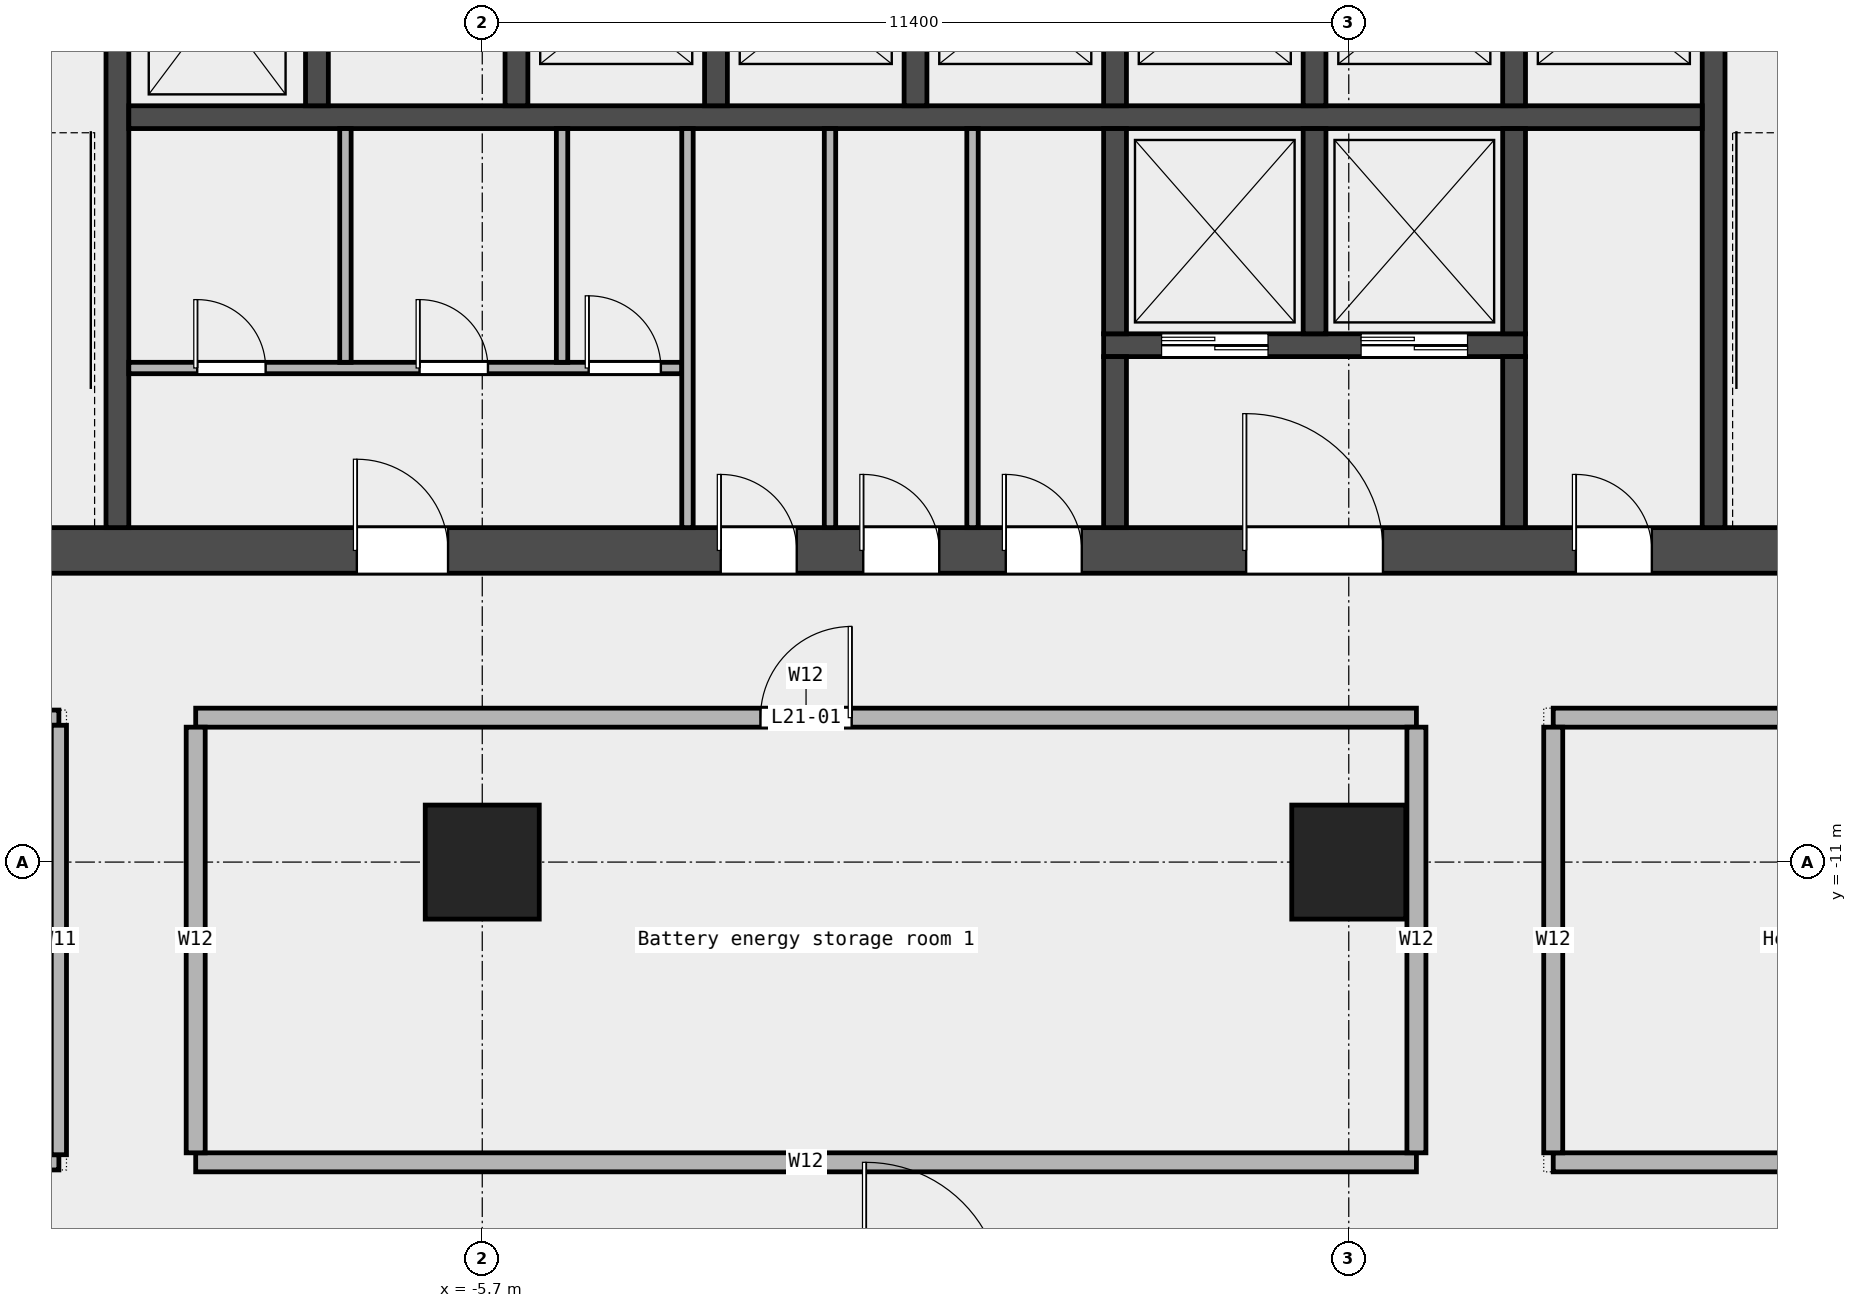
"""IFC4 building model, lengths in metres.
Left out: names, types, materials, properties, quantities, classifications, styles, units other than length and angle.
Written with IfcOpenShell. Run it as: python <this file> out.ifc"""

import sys

from ifc_helpers import new_model, si_unit, direction, frame, frame_2d, origin, origin_2d, place, context, subcontext, project, spatial, rectangle, extrude, element, fill, save


model = new_model("IFC4")
c1 = context("Model", 3, precision=1e-05, world=origin(), true_north=direction((0.0, 1.0)))
c2 = subcontext(c1, "Body", "Model", "MODEL_VIEW")
j1 = project(units=[si_unit("LENGTHUNIT", "METRE"), si_unit("PLANEANGLEUNIT", "RADIAN")], contexts=[c1])
p1 = place(None, origin())
s1 = spatial("IfcSite", under=j1, at=p1, CompositionType="ELEMENT")
p2 = place(p1, origin())
s2 = spatial("IfcBuilding", under=s1, at=p2, CompositionType="ELEMENT")
p3 = place(p2, frame((0.0, 0.0, 108.1)))
s3 = spatial("IfcBuildingStorey", under=s2, at=p3, CompositionType="ELEMENT", Elevation=108.1)
for number, where, z_axis, x_axis in (
    (1, (-5.7, -11.0, 0.0), (0.0, 0.0, 1.0), (1.0, 0.0, 0.0)),
    (2, (5.7, -11.0, 0.0), (0.0, 0.0, 1.0), (1.0, 0.0, 0.0)),
):
    element("IfcColumn", number, at=place(p3, frame(where, z_axis=z_axis, x_axis=x_axis)), inside=s3, PredefinedType="COLUMN", context=c2, shape_type="SweptSolid", body=[
        extrude(rectangle(XDim=1.5, YDim=1.5, at=origin_2d()), origin(), (0.0, 0.0, 1.0), 4.05),
    ])
p4 = place(p3, frame((-18.365, -14.95, 0.0), z_axis=(0.0, 0.0, 1.0), x_axis=(1.0, 0.0, 0.0)))
e3 = element("IfcWall", 3, at=p4, inside=s3, PredefinedType="PARTITIONING", context=c2, shape_type="SweptSolid", body=[
    extrude(rectangle(XDim=7.095, YDim=0.2, at=frame_2d((3.547, 0.0))), origin(), (0.0, 0.0, 1.0), 4.05),
])
p5 = place(p4, frame((3.097, 0.0, 0.0)))
e4 = element("IfcOpeningElement", 4, at=p5, cuts=e3, PredefinedType="OPENING", context=c2, shape_type="SweptSolid", body=[
    extrude(rectangle(XDim=0.9, YDim=2.1, at=frame_2d((0.45, 1.05))), frame((0.0, 0.112, 0.0), z_axis=(0.0, -1.0, 0.0), x_axis=(1.0, 0.0, 0.0)), (0.0, 0.0, 1.0), 0.224),
])
p6 = place(p3, frame((-9.47, -14.95, 0.0), z_axis=(0.0, 0.0, 1.0), x_axis=(1.0, 0.0, 0.0)))
e5 = element("IfcWall", 5, at=p6, inside=s3, PredefinedType="PARTITIONING", context=c2, shape_type="SweptSolid", body=[
    extrude(rectangle(XDim=16.06, YDim=0.25, at=frame_2d((8.03, 0.0))), origin(), (0.0, 0.0, 1.0), 4.05),
])
p7 = place(p3, frame((8.39, -14.95, 0.0), z_axis=(0.0, 0.0, 1.0), x_axis=(1.0, 0.0, 0.0)))
e6 = element("IfcWall", 6, at=p7, inside=s3, PredefinedType="PARTITIONING", context=c2, shape_type="SweptSolid", body=[
    extrude(rectangle(XDim=7.655, YDim=0.25, at=frame_2d((3.828, 0.0))), origin(), (0.0, 0.0, 1.0), 4.05),
])
p8 = place(p3, frame((-16.3, -9.1, 0.0), z_axis=(0.0, 0.0, 1.0), x_axis=(1.0, 0.0, 0.0)))
e7 = element("IfcWall", 7, at=p8, inside=s3, PredefinedType="PARTITIONING", context=c2, shape_type="SweptSolid", body=[
    extrude(rectangle(XDim=5.03, YDim=0.2, at=frame_2d((2.515, 0.0))), origin(), (0.0, 0.0, 1.0), 4.05),
])
p9 = place(p3, frame((-9.47, -9.1, 0.0), z_axis=(0.0, 0.0, 1.0), x_axis=(1.0, 0.0, 0.0)))
e8 = element("IfcWall", 8, at=p9, inside=s3, PredefinedType="PARTITIONING", context=c2, shape_type="SweptSolid", body=[
    extrude(rectangle(XDim=16.06, YDim=0.25, at=frame_2d((8.03, 0.0))), origin(), (0.0, 0.0, 1.0), 4.05),
])
p10 = place(p9, frame((7.43, 0.0, 0.0)))
e9 = element("IfcOpeningElement", 9, at=p10, cuts=e8, PredefinedType="OPENING", context=c2, shape_type="SweptSolid", body=[
    extrude(rectangle(XDim=1.2, YDim=2.1, at=frame_2d((0.6, 1.05))), frame((0.0, 0.137, 0.0), z_axis=(0.0, -1.0, 0.0), x_axis=(1.0, 0.0, 0.0)), (0.0, 0.0, 1.0), 0.274),
])
p11 = place(p3, frame((8.39, -9.1, 0.0), z_axis=(0.0, 0.0, 1.0), x_axis=(1.0, 0.0, 0.0)))
e10 = element("IfcWall", 10, at=p11, inside=s3, PredefinedType="PARTITIONING", context=c2, shape_type="SweptSolid", body=[
    extrude(rectangle(XDim=7.655, YDim=0.25, at=frame_2d((3.828, 0.0))), origin(), (0.0, 0.0, 1.0), 4.05),
])
p12 = place(p11, frame((3.377, 0.0, 0.0)))
e11 = element("IfcOpeningElement", 11, at=p12, cuts=e10, PredefinedType="OPENING", context=c2, shape_type="SweptSolid", body=[
    extrude(rectangle(XDim=0.9, YDim=2.1, at=frame_2d((0.45, 1.05))), frame((0.0, 0.137, 0.0), z_axis=(0.0, -1.0, 0.0), x_axis=(1.0, 0.0, 0.0)), (0.0, 0.0, 1.0), 0.274),
])
p13 = place(p3, frame((-11.27, -14.85, 0.0), z_axis=(0.0, 0.0, 1.0), x_axis=(0.0, 1.0, 0.0)))
e12 = element("IfcWall", 12, at=p13, inside=s3, PredefinedType="PARTITIONING", context=c2, shape_type="SweptSolid", body=[
    extrude(rectangle(XDim=5.65, YDim=0.2, at=frame_2d((2.825, 0.0))), origin(), (0.0, 0.0, 1.0), 4.05),
])
for number, where, z_axis, x_axis in (
    (13, (-9.47, -14.825, 0.0), (0.0, 0.0, 1.0), (0.0, 1.0, 0.0)),
    (14, (6.59, -14.825, 0.0), (0.0, 0.0, 1.0), (0.0, 1.0, 0.0)),
    (15, (8.39, -14.825, 0.0), (0.0, 0.0, 1.0), (0.0, 1.0, 0.0)),
):
    element("IfcWall", number, at=place(p3, frame(where, z_axis=z_axis, x_axis=x_axis)), inside=s3, PredefinedType="PARTITIONING", context=c2, shape_type="SweptSolid", body=[
        extrude(rectangle(XDim=5.6, YDim=0.25, at=frame_2d((2.8, 0.0))), origin(), (0.0, 0.0, 1.0), 4.05),
    ])
p14 = place(p3, frame((-14.4, -6.9, 0.0), z_axis=(0.0, 0.0, 1.0), x_axis=(1.0, 0.0, 0.0)))
e16 = element("IfcWall", 16, at=p14, inside=s3, PredefinedType="SHEAR", context=c2, shape_type="SweptSolid", body=[
    extrude(rectangle(XDim=28.8, YDim=0.6, at=frame_2d((14.4, 0.0))), origin(), (0.0, 0.0, 1.0), 4.2),
])
p15 = place(p14, frame((7.05, 0.0, 0.0)))
e17 = element("IfcOpeningElement", 17, at=p15, cuts=e16, PredefinedType="OPENING", context=c2, shape_type="SweptSolid", body=[
    extrude(rectangle(XDim=1.2, YDim=2.1, at=frame_2d((0.6, 1.05))), frame((0.0, 0.312, 0.0), z_axis=(0.0, -1.0, 0.0), x_axis=(1.0, 0.0, 0.0)), (0.0, 0.0, 1.0), 0.624),
])
p16 = place(p14, frame((11.837, 0.0, 0.0)))
e18 = element("IfcOpeningElement", 18, at=p16, cuts=e16, PredefinedType="OPENING", context=c2, shape_type="SweptSolid", body=[
    extrude(rectangle(XDim=1.0, YDim=2.1, at=frame_2d((0.5, 1.05))), frame((0.0, 0.312, 0.0), z_axis=(0.0, -1.0, 0.0), x_axis=(1.0, 0.0, 0.0)), (0.0, 0.0, 1.0), 0.624),
])
p17 = place(p14, frame((13.712, 0.0, 0.0)))
e19 = element("IfcOpeningElement", 19, at=p17, cuts=e16, PredefinedType="OPENING", context=c2, shape_type="SweptSolid", body=[
    extrude(rectangle(XDim=1.0, YDim=2.1, at=frame_2d((0.5, 1.05))), frame((0.0, 0.312, 0.0), z_axis=(0.0, -1.0, 0.0), x_axis=(1.0, 0.0, 0.0)), (0.0, 0.0, 1.0), 0.624),
])
p18 = place(p14, frame((15.587, 0.0, 0.0)))
e20 = element("IfcOpeningElement", 20, at=p18, cuts=e16, PredefinedType="OPENING", context=c2, shape_type="SweptSolid", body=[
    extrude(rectangle(XDim=1.0, YDim=2.1, at=frame_2d((0.5, 1.05))), frame((0.0, 0.312, 0.0), z_axis=(0.0, -1.0, 0.0), x_axis=(1.0, 0.0, 0.0)), (0.0, 0.0, 1.0), 0.624),
])
p19 = place(p14, frame((18.75, 0.0, 0.0)))
e21 = element("IfcOpeningElement", 21, at=p19, cuts=e16, PredefinedType="OPENING", context=c2, shape_type="SweptSolid", body=[
    extrude(rectangle(XDim=1.8, YDim=2.1, at=frame_2d((0.9, 1.05))), frame((0.0, 0.312, 0.0), z_axis=(0.0, -1.0, 0.0), x_axis=(1.0, 0.0, 0.0)), (0.0, 0.0, 1.0), 0.624),
])
p20 = place(p14, frame((23.087, 0.0, 0.0)))
e22 = element("IfcOpeningElement", 22, at=p20, cuts=e16, PredefinedType="OPENING", context=c2, shape_type="SweptSolid", body=[
    extrude(rectangle(XDim=1.0, YDim=2.1, at=frame_2d((0.5, 1.05))), frame((0.0, 0.312, 0.0), z_axis=(0.0, -1.0, 0.0), x_axis=(1.0, 0.0, 0.0)), (0.0, 0.0, 1.0), 0.624),
])
for number, where, z_axis, x_axis in (
    (23, (-10.5, -6.6, 0.0), (0.0, 0.0, 1.0), (0.0, 1.0, 0.0)),
    (24, (10.5, -6.6, 0.0), (0.0, 0.0, 1.0), (0.0, 1.0, 0.0)),
):
    element("IfcWall", number, at=place(p3, frame(where, z_axis=z_axis, x_axis=x_axis)), inside=s3, PredefinedType="SHEAR", context=c2, shape_type="SweptSolid", body=[
        extrude(rectangle(XDim=8.55, YDim=0.3, at=frame_2d((4.275, 0.0))), origin(), (0.0, 0.0, 1.0), 4.2),
    ])
p21 = place(p3, frame((-10.35, -1.2, 0.0), z_axis=(0.0, 0.0, 1.0), x_axis=(1.0, 0.0, 0.0)))
e25 = element("IfcWall", 25, at=p21, inside=s3, PredefinedType="SOLIDWALL", context=c2, shape_type="SweptSolid", body=[
    extrude(rectangle(XDim=20.7, YDim=0.3, at=frame_2d((10.35, 0.0))), origin(), (0.0, 0.0, 1.0), 4.2),
])
for number, where, z_axis, x_axis in (
    (26, (-7.875, -1.05, 0.0), (0.0, 0.0, 1.0), (0.0, 1.0, 0.0)),
    (27, (-5.25, -1.05, 0.0), (0.0, 0.0, 1.0), (0.0, 1.0, 0.0)),
    (28, (-2.625, -1.05, 0.0), (0.0, 0.0, 1.0), (0.0, 1.0, 0.0)),
    (29, (0.0, -1.05, 0.0), (0.0, 0.0, 1.0), (0.0, 1.0, 0.0)),
    (30, (2.625, -1.05, 0.0), (0.0, 0.0, 1.0), (0.0, 1.0, 0.0)),
    (31, (5.25, -1.05, 0.0), (0.0, 0.0, 1.0), (0.0, 1.0, 0.0)),
    (32, (7.875, -1.05, 0.0), (0.0, 0.0, 1.0), (0.0, 1.0, 0.0)),
):
    element("IfcWall", number, at=place(p3, frame(where, z_axis=z_axis, x_axis=x_axis)), inside=s3, PredefinedType="SOLIDWALL", context=c2, shape_type="SweptSolid", body=[
        extrude(rectangle(XDim=2.7, YDim=0.3, at=frame_2d((1.35, 0.0))), origin(), (0.0, 0.0, 1.0), 4.2),
    ])
p22 = place(p3, frame((2.475, -4.2, 0.0), z_axis=(0.0, 0.0, 1.0), x_axis=(1.0, 0.0, 0.0)))
e33 = element("IfcWall", 33, at=p22, inside=s3, PredefinedType="SOLIDWALL", context=c2, shape_type="SweptSolid", body=[
    extrude(rectangle(XDim=5.55, YDim=0.3, at=frame_2d((2.775, 0.0))), origin(), (0.0, 0.0, 1.0), 4.2),
])
p23 = place(p22, frame((0.762, 0.0, 0.0)))
e34 = element("IfcOpeningElement", 34, at=p23, cuts=e33, PredefinedType="OPENING", context=c2, shape_type="SweptSolid", body=[
    extrude(rectangle(XDim=1.4, YDim=2.1, at=frame_2d((0.7, 1.05))), frame((0.0, 0.162, 0.0), z_axis=(0.0, -1.0, 0.0), x_axis=(1.0, 0.0, 0.0)), (0.0, 0.0, 1.0), 0.324),
])
p24 = place(p22, frame((3.387, 0.0, 0.0)))
e35 = element("IfcOpeningElement", 35, at=p24, cuts=e33, PredefinedType="OPENING", context=c2, shape_type="SweptSolid", body=[
    extrude(rectangle(XDim=1.4, YDim=2.1, at=frame_2d((0.7, 1.05))), frame((0.0, 0.162, 0.0), z_axis=(0.0, -1.0, 0.0), x_axis=(1.0, 0.0, 0.0)), (0.0, 0.0, 1.0), 0.324),
])
p25 = place(p3, frame((2.625, -4.05, 0.0), z_axis=(0.0, 0.0, 1.0), x_axis=(0.0, 1.0, 0.0)))
e36 = element("IfcWall", 36, at=p25, inside=s3, PredefinedType="SOLIDWALL", context=c2, shape_type="SweptSolid", body=[
    extrude(rectangle(XDim=2.7, YDim=0.3, at=frame_2d((1.35, 0.0))), origin(), (0.0, 0.0, 1.0), 4.2),
])
p26 = place(p3, frame((2.625, -6.6, 0.0), z_axis=(0.0, 0.0, 1.0), x_axis=(0.0, 1.0, 0.0)))
e37 = element("IfcWall", 37, at=p26, inside=s3, PredefinedType="SOLIDWALL", context=c2, shape_type="SweptSolid", body=[
    extrude(rectangle(XDim=2.25, YDim=0.3, at=frame_2d((1.125, 0.0))), origin(), (0.0, 0.0, 1.0), 4.2),
])
for number, where, z_axis, x_axis in (
    (38, (5.25, -4.05, 0.0), (0.0, 0.0, 1.0), (0.0, 1.0, 0.0)),
    (39, (7.875, -4.05, 0.0), (0.0, 0.0, 1.0), (0.0, 1.0, 0.0)),
):
    element("IfcWall", number, at=place(p3, frame(where, z_axis=z_axis, x_axis=x_axis)), inside=s3, PredefinedType="SOLIDWALL", context=c2, shape_type="SweptSolid", body=[
        extrude(rectangle(XDim=2.7, YDim=0.3, at=frame_2d((1.35, 0.0))), origin(), (0.0, 0.0, 1.0), 4.2),
    ])
p27 = place(p3, frame((7.875, -6.6, 0.0), z_axis=(0.0, 0.0, 1.0), x_axis=(0.0, 1.0, 0.0)))
e40 = element("IfcWall", 40, at=p27, inside=s3, PredefinedType="SOLIDWALL", context=c2, shape_type="SweptSolid", body=[
    extrude(rectangle(XDim=2.25, YDim=0.3, at=frame_2d((1.125, 0.0))), origin(), (0.0, 0.0, 1.0), 4.2),
])
p28 = place(p3, frame((-10.35, -4.5, 0.0), z_axis=(0.0, 0.0, 1.0), x_axis=(1.0, 0.0, 0.0)))
e41 = element("IfcWall", 41, at=p28, inside=s3, PredefinedType="PARTITIONING", context=c2, shape_type="SweptSolid", body=[
    extrude(rectangle(XDim=7.275, YDim=0.15, at=frame_2d((3.638, 0.0))), origin(), (0.0, 0.0, 1.0), 4.2),
])
p29 = place(p28, frame((0.9, 0.0, 0.0)))
e42 = element("IfcOpeningElement", 42, at=p29, cuts=e41, PredefinedType="OPENING", context=c2, shape_type="SweptSolid", body=[
    extrude(rectangle(XDim=0.9, YDim=2.1, at=frame_2d((0.45, 1.05))), frame((0.0, 0.087, 0.0), z_axis=(0.0, -1.0, 0.0), x_axis=(1.0, 0.0, 0.0)), (0.0, 0.0, 1.0), 0.174),
])
p30 = place(p28, frame((3.825, 0.0, 0.0)))
e43 = element("IfcOpeningElement", 43, at=p30, cuts=e41, PredefinedType="OPENING", context=c2, shape_type="SweptSolid", body=[
    extrude(rectangle(XDim=0.9, YDim=2.1, at=frame_2d((0.45, 1.05))), frame((0.0, 0.087, 0.0), z_axis=(0.0, -1.0, 0.0), x_axis=(1.0, 0.0, 0.0)), (0.0, 0.0, 1.0), 0.174),
])
p31 = place(p28, frame((6.05, 0.0, 0.0)))
e44 = element("IfcOpeningElement", 44, at=p31, cuts=e41, PredefinedType="OPENING", context=c2, shape_type="SweptSolid", body=[
    extrude(rectangle(XDim=0.95, YDim=2.1, at=frame_2d((0.475, 1.05))), frame((0.0, 0.087, 0.0), z_axis=(0.0, -1.0, 0.0), x_axis=(1.0, 0.0, 0.0)), (0.0, 0.0, 1.0), 0.174),
])
for number, where, z_axis, x_axis in (
    (45, (-7.5, -4.425, 0.0), (0.0, 0.0, 1.0), (0.0, 1.0, 0.0)),
    (46, (-4.65, -4.425, 0.0), (0.0, 0.0, 1.0), (0.0, 1.0, 0.0)),
):
    element("IfcWall", number, at=place(p3, frame(where, z_axis=z_axis, x_axis=x_axis)), inside=s3, PredefinedType="PARTITIONING", context=c2, shape_type="SweptSolid", body=[
        extrude(rectangle(XDim=3.075, YDim=0.15, at=frame_2d((1.538, 0.0))), origin(), (0.0, 0.0, 1.0), 4.2),
    ])
for number, where, z_axis, x_axis in (
    (47, (-3.0, -6.6, 0.0), (0.0, 0.0, 1.0), (0.0, 1.0, 0.0)),
    (48, (-1.125, -6.6, 0.0), (0.0, 0.0, 1.0), (0.0, 1.0, 0.0)),
    (49, (0.75, -6.6, 0.0), (0.0, 0.0, 1.0), (0.0, 1.0, 0.0)),
):
    element("IfcWall", number, at=place(p3, frame(where, z_axis=z_axis, x_axis=x_axis)), inside=s3, PredefinedType="PARTITIONING", context=c2, shape_type="SweptSolid", body=[
        extrude(rectangle(XDim=5.25, YDim=0.15, at=frame_2d((2.625, 0.0))), origin(), (0.0, 0.0, 1.0), 4.2),
    ])
p32 = place(p10, origin())
e50 = element("IfcDoor", 50, at=p32, inside=s3, OperationType="SINGLE_SWING_RIGHT", PredefinedType="DOOR", context=c2, shape_type="SweptSolid", body=[
    extrude(rectangle(XDim=1.2, YDim=2.1, at=frame_2d((0.6, 1.05))), frame((0.0, 0.025, 0.0), z_axis=(0.0, -1.0, 0.0), x_axis=(1.0, 0.0, 0.0)), (0.0, 0.0, 1.0), 0.05),
])
fill(e9, e50)
p33 = place(p23, origin())
e51 = element("IfcDoor", 51, at=p33, inside=s3, OperationType="DOUBLE_DOOR_SLIDING", PredefinedType="DOOR", context=c2, shape_type="SweptSolid", body=[
    extrude(rectangle(XDim=1.4, YDim=2.1, at=frame_2d((0.7, 1.05))), frame((0.0, 0.025, 0.0), z_axis=(0.0, -1.0, 0.0), x_axis=(1.0, 0.0, 0.0)), (0.0, 0.0, 1.0), 0.05),
])
fill(e34, e51)
p34 = place(p24, origin())
e52 = element("IfcDoor", 52, at=p34, inside=s3, OperationType="DOUBLE_DOOR_SLIDING", PredefinedType="DOOR", context=c2, shape_type="SweptSolid", body=[
    extrude(rectangle(XDim=1.4, YDim=2.1, at=frame_2d((0.7, 1.05))), frame((0.0, 0.025, 0.0), z_axis=(0.0, -1.0, 0.0), x_axis=(1.0, 0.0, 0.0)), (0.0, 0.0, 1.0), 0.05),
])
fill(e35, e52)
p35 = place(p15, origin())
e53 = element("IfcDoor", 53, at=p35, inside=s3, OperationType="SINGLE_SWING_LEFT", PredefinedType="DOOR", context=c2, shape_type="SweptSolid", body=[
    extrude(rectangle(XDim=1.2, YDim=2.1, at=frame_2d((0.6, 1.05))), frame((0.0, 0.025, 0.0), z_axis=(0.0, -1.0, 0.0), x_axis=(1.0, 0.0, 0.0)), (0.0, 0.0, 1.0), 0.05),
])
fill(e17, e53)
p36 = place(p29, origin())
e54 = element("IfcDoor", 54, at=p36, inside=s3, OperationType="SINGLE_SWING_LEFT", PredefinedType="DOOR", context=c2, shape_type="SweptSolid", body=[
    extrude(rectangle(XDim=0.9, YDim=2.1, at=frame_2d((0.45, 1.05))), frame((0.0, 0.025, 0.0), z_axis=(0.0, -1.0, 0.0), x_axis=(1.0, 0.0, 0.0)), (0.0, 0.0, 1.0), 0.05),
])
fill(e42, e54)
p37 = place(p30, origin())
e55 = element("IfcDoor", 55, at=p37, inside=s3, OperationType="SINGLE_SWING_LEFT", PredefinedType="DOOR", context=c2, shape_type="SweptSolid", body=[
    extrude(rectangle(XDim=0.9, YDim=2.1, at=frame_2d((0.45, 1.05))), frame((0.0, 0.025, 0.0), z_axis=(0.0, -1.0, 0.0), x_axis=(1.0, 0.0, 0.0)), (0.0, 0.0, 1.0), 0.05),
])
fill(e43, e55)
p38 = place(p31, origin())
e56 = element("IfcDoor", 56, at=p38, inside=s3, OperationType="SINGLE_SWING_LEFT", PredefinedType="DOOR", context=c2, shape_type="SweptSolid", body=[
    extrude(rectangle(XDim=0.95, YDim=2.1, at=frame_2d((0.475, 1.05))), frame((0.0, 0.025, 0.0), z_axis=(0.0, -1.0, 0.0), x_axis=(1.0, 0.0, 0.0)), (0.0, 0.0, 1.0), 0.05),
])
fill(e44, e56)
p39 = place(p16, origin())
e57 = element("IfcDoor", 57, at=p39, inside=s3, OperationType="SINGLE_SWING_LEFT", PredefinedType="DOOR", context=c2, shape_type="SweptSolid", body=[
    extrude(rectangle(XDim=1.0, YDim=2.1, at=frame_2d((0.5, 1.05))), frame((0.0, 0.025, 0.0), z_axis=(0.0, -1.0, 0.0), x_axis=(1.0, 0.0, 0.0)), (0.0, 0.0, 1.0), 0.05),
])
fill(e18, e57)
p40 = place(p17, origin())
e58 = element("IfcDoor", 58, at=p40, inside=s3, OperationType="SINGLE_SWING_LEFT", PredefinedType="DOOR", context=c2, shape_type="SweptSolid", body=[
    extrude(rectangle(XDim=1.0, YDim=2.1, at=frame_2d((0.5, 1.05))), frame((0.0, 0.025, 0.0), z_axis=(0.0, -1.0, 0.0), x_axis=(1.0, 0.0, 0.0)), (0.0, 0.0, 1.0), 0.05),
])
fill(e19, e58)
p41 = place(p18, origin())
e59 = element("IfcDoor", 59, at=p41, inside=s3, OperationType="SINGLE_SWING_LEFT", PredefinedType="DOOR", context=c2, shape_type="SweptSolid", body=[
    extrude(rectangle(XDim=1.0, YDim=2.1, at=frame_2d((0.5, 1.05))), frame((0.0, 0.025, 0.0), z_axis=(0.0, -1.0, 0.0), x_axis=(1.0, 0.0, 0.0)), (0.0, 0.0, 1.0), 0.05),
])
fill(e20, e59)
p42 = place(p19, origin())
e60 = element("IfcDoor", 60, at=p42, inside=s3, OperationType="DOUBLE_DOOR_SINGLE_SWING", PredefinedType="DOOR", context=c2, shape_type="SweptSolid", body=[
    extrude(rectangle(XDim=1.8, YDim=2.1, at=frame_2d((0.9, 1.05))), frame((0.0, 0.025, 0.0), z_axis=(0.0, -1.0, 0.0), x_axis=(1.0, 0.0, 0.0)), (0.0, 0.0, 1.0), 0.05),
])
fill(e21, e60)
p43 = place(p20, origin())
e61 = element("IfcDoor", 61, at=p43, inside=s3, OperationType="SINGLE_SWING_LEFT", PredefinedType="DOOR", context=c2, shape_type="SweptSolid", body=[
    extrude(rectangle(XDim=1.0, YDim=2.1, at=frame_2d((0.5, 1.05))), frame((0.0, 0.025, 0.0), z_axis=(0.0, -1.0, 0.0), x_axis=(1.0, 0.0, 0.0)), (0.0, 0.0, 1.0), 0.05),
])
fill(e22, e61)
save(model, sys.argv[1])
